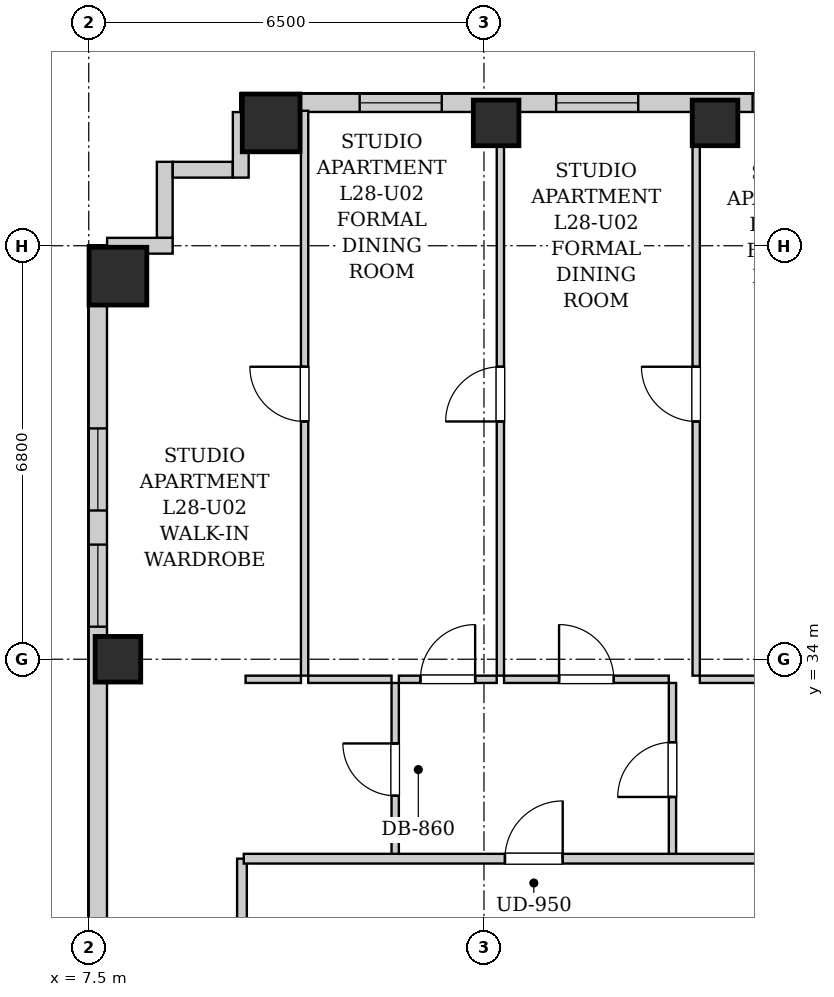
"""IFC4 building model, lengths in metres.
Left out: names, types, materials, properties, quantities, classifications, styles, units other than length and angle.
Written with IfcOpenShell. Run it as: python <this file> out.ifc"""

import sys

from ifc_helpers import new_model, si_unit, direction, frame, frame_2d, origin, origin_2d, place, context, subcontext, project, spatial, rectangle, extrude, element, fill, save


model = new_model("IFC4")
c1 = context("Model", 3, precision=1e-05, world=origin(), true_north=direction((0.0, 1.0)))
c2 = subcontext(c1, "Body", "Model", "MODEL_VIEW")
j1 = project(units=[si_unit("LENGTHUNIT", "METRE"), si_unit("PLANEANGLEUNIT", "RADIAN")], contexts=[c1])
p1 = place(None, origin())
s1 = spatial("IfcSite", under=j1, at=p1, CompositionType="ELEMENT")
p2 = place(p1, origin())
s2 = spatial("IfcBuilding", under=s1, at=p2, CompositionType="ELEMENT")
p3 = place(p2, frame((0.0, 0.0, 100.7)))
s3 = spatial("IfcBuildingStorey", under=s2, at=p3, CompositionType="ELEMENT", Elevation=100.7)
p4 = place(p3, frame((10.5, 42.82, 0.0), z_axis=(0.0, 0.0, 1.0), x_axis=(1.0, 0.0, 0.0)))
e1 = element("IfcColumn", 1, at=p4, inside=s3, PredefinedType="COLUMN", context=c2, shape_type="SweptSolid", body=[
    extrude(rectangle(XDim=0.95, YDim=0.95, at=origin_2d()), origin(), (0.0, 0.0, 1.0), 3.2),
])
for number, where, z_axis, x_axis in (
    (2, (14.2, 42.82, 0.0), (0.0, 0.0, 1.0), (1.0, 0.0, 0.0)),
    (3, (17.8, 42.82, 0.0), (0.0, 0.0, 1.0), (1.0, 0.0, 0.0)),
    (4, (7.98, 34.0, 0.0), (0.0, 0.0, 1.0), (1.0, 0.0, 0.0)),
):
    element("IfcColumn", number, at=place(p3, frame(where, z_axis=z_axis, x_axis=x_axis)), inside=s3, PredefinedType="COLUMN", context=c2, shape_type="SweptSolid", body=[
        extrude(rectangle(XDim=0.75, YDim=0.75, at=origin_2d()), origin(), (0.0, 0.0, 1.0), 3.2),
    ])
p5 = place(p3, frame((7.98, 40.3, 0.0), z_axis=(0.0, 0.0, 1.0), x_axis=(1.0, 0.0, 0.0)))
e5 = element("IfcColumn", 5, at=p5, inside=s3, PredefinedType="COLUMN", context=c2, shape_type="SweptSolid", body=[
    extrude(rectangle(XDim=0.95, YDim=0.95, at=origin_2d()), origin(), (0.0, 0.0, 1.0), 3.2),
])
p6 = place(p3, frame((10.0, 43.15, 0.0), z_axis=(0.0, 0.0, 1.0), x_axis=(1.0, 0.0, 0.0)))
e6 = element("IfcWall", 6, at=p6, inside=s3, PredefinedType="SOLIDWALL", context=c2, shape_type="SweptSolid", body=[
    extrude(rectangle(XDim=24.35, YDim=0.3, at=frame_2d((12.175, 0.0))), origin(), (0.0, 0.0, 1.0), 2.94),
])
p7 = place(p6, frame((1.956, 0.0, 0.55)))
e7 = element("IfcOpeningElement", 7, at=p7, cuts=e6, PredefinedType="OPENING", context=c2, shape_type="SweptSolid", body=[
    extrude(rectangle(XDim=1.35, YDim=1.2, at=frame_2d((0.675, 0.6))), frame((0.0, 0.16, 0.0), z_axis=(0.0, -1.0, 0.0), x_axis=(1.0, 0.0, 0.0)), (0.0, 0.0, 1.0), 0.32),
])
p8 = place(p6, frame((5.187, 0.0, 0.55)))
e8 = element("IfcOpeningElement", 8, at=p8, cuts=e6, PredefinedType="OPENING", context=c2, shape_type="SweptSolid", body=[
    extrude(rectangle(XDim=1.35, YDim=1.2, at=frame_2d((0.675, 0.6))), frame((0.0, 0.16, 0.0), z_axis=(0.0, -1.0, 0.0), x_axis=(1.0, 0.0, 0.0)), (0.0, 0.0, 1.0), 0.32),
])
p9 = place(p6, frame((8.418, 0.0, 0.55)))
e9 = element("IfcOpeningElement", 9, at=p9, cuts=e6, PredefinedType="OPENING", context=c2, shape_type="SweptSolid", body=[
    extrude(rectangle(XDim=1.35, YDim=1.2, at=frame_2d((0.675, 0.6))), frame((0.0, 0.16, 0.0), z_axis=(0.0, -1.0, 0.0), x_axis=(1.0, 0.0, 0.0)), (0.0, 0.0, 1.0), 0.32),
])
p10 = place(p6, frame((11.15, 0.0, 0.55)))
e10 = element("IfcOpeningElement", 10, at=p10, cuts=e6, PredefinedType="OPENING", context=c2, shape_type="SweptSolid", body=[
    extrude(rectangle(XDim=1.35, YDim=1.2, at=frame_2d((0.675, 0.6))), frame((0.0, 0.16, 0.0), z_axis=(0.0, -1.0, 0.0), x_axis=(1.0, 0.0, 0.0)), (0.0, 0.0, 1.0), 0.32),
])
p11 = place(p6, frame((18.038, 0.0, 0.55)))
e11 = element("IfcOpeningElement", 11, at=p11, cuts=e6, PredefinedType="OPENING", context=c2, shape_type="SweptSolid", body=[
    extrude(rectangle(XDim=1.35, YDim=1.2, at=frame_2d((0.675, 0.6))), frame((0.0, 0.16, 0.0), z_axis=(0.0, -1.0, 0.0), x_axis=(1.0, 0.0, 0.0)), (0.0, 0.0, 1.0), 0.32),
])
p12 = place(p6, frame((21.315, 0.0, 0.55)))
e12 = element("IfcOpeningElement", 12, at=p12, cuts=e6, PredefinedType="OPENING", context=c2, shape_type="SweptSolid", body=[
    extrude(rectangle(XDim=1.35, YDim=1.2, at=frame_2d((0.675, 0.6))), frame((0.0, 0.16, 0.0), z_axis=(0.0, -1.0, 0.0), x_axis=(1.0, 0.0, 0.0)), (0.0, 0.0, 1.0), 0.32),
])
p13 = place(p3, frame((7.65, 2.5, 0.0), z_axis=(0.0, 0.0, 1.0), x_axis=(0.0, 1.0, 0.0)))
e13 = element("IfcWall", 13, at=p13, inside=s3, PredefinedType="SOLIDWALL", context=c2, shape_type="SweptSolid", body=[
    extrude(rectangle(XDim=38.3, YDim=0.3, at=frame_2d((19.15, 0.0))), origin(), (0.0, 0.0, 1.0), 2.94),
])
p14 = place(p13, frame((3.38, 0.0, 0.55)))
e14 = element("IfcOpeningElement", 14, at=p14, cuts=e13, PredefinedType="OPENING", context=c2, shape_type="SweptSolid", body=[
    extrude(rectangle(XDim=1.35, YDim=1.2, at=frame_2d((0.675, 0.6))), frame((0.0, 0.16, 0.0), z_axis=(0.0, -1.0, 0.0), x_axis=(1.0, 0.0, 0.0)), (0.0, 0.0, 1.0), 0.32),
])
p15 = place(p13, frame((1.135, 0.0, 0.55)))
e15 = element("IfcOpeningElement", 15, at=p15, cuts=e13, PredefinedType="OPENING", context=c2, shape_type="SweptSolid", body=[
    extrude(rectangle(XDim=1.35, YDim=1.2, at=frame_2d((0.675, 0.6))), frame((0.0, 0.16, 0.0), z_axis=(0.0, -1.0, 0.0), x_axis=(1.0, 0.0, 0.0)), (0.0, 0.0, 1.0), 0.32),
])
p16 = place(p13, frame((33.946, 0.0, 0.55)))
e16 = element("IfcOpeningElement", 16, at=p16, cuts=e13, PredefinedType="OPENING", context=c2, shape_type="SweptSolid", body=[
    extrude(rectangle(XDim=1.35, YDim=1.2, at=frame_2d((0.675, 0.6))), frame((0.0, 0.16, 0.0), z_axis=(0.0, -1.0, 0.0), x_axis=(1.0, 0.0, 0.0)), (0.0, 0.0, 1.0), 0.32),
])
p17 = place(p13, frame((32.035, 0.0, 0.55)))
e17 = element("IfcOpeningElement", 17, at=p17, cuts=e13, PredefinedType="OPENING", context=c2, shape_type="SweptSolid", body=[
    extrude(rectangle(XDim=1.35, YDim=1.2, at=frame_2d((0.675, 0.6))), frame((0.0, 0.16, 0.0), z_axis=(0.0, -1.0, 0.0), x_axis=(1.0, 0.0, 0.0)), (0.0, 0.0, 1.0), 0.32),
])
p18 = place(p13, frame((15.65, 0.0, 0.55)))
e18 = element("IfcOpeningElement", 18, at=p18, cuts=e13, PredefinedType="OPENING", context=c2, shape_type="SweptSolid", body=[
    extrude(rectangle(XDim=1.35, YDim=1.2, at=frame_2d((0.675, 0.6))), frame((0.0, 0.16, 0.0), z_axis=(0.0, -1.0, 0.0), x_axis=(1.0, 0.0, 0.0)), (0.0, 0.0, 1.0), 0.32),
])
p19 = place(p13, frame((13.035, 0.0, 0.55)))
e19 = element("IfcOpeningElement", 19, at=p19, cuts=e13, PredefinedType="OPENING", context=c2, shape_type="SweptSolid", body=[
    extrude(rectangle(XDim=1.35, YDim=1.2, at=frame_2d((0.675, 0.6))), frame((0.0, 0.16, 0.0), z_axis=(0.0, -1.0, 0.0), x_axis=(1.0, 0.0, 0.0)), (0.0, 0.0, 1.0), 0.32),
])
p20 = place(p13, frame((22.831, 0.0, 0.55)))
e20 = element("IfcOpeningElement", 20, at=p20, cuts=e13, PredefinedType="OPENING", context=c2, shape_type="SweptSolid", body=[
    extrude(rectangle(XDim=1.35, YDim=1.2, at=frame_2d((0.675, 0.6))), frame((0.0, 0.16, 0.0), z_axis=(0.0, -1.0, 0.0), x_axis=(1.0, 0.0, 0.0)), (0.0, 0.0, 1.0), 0.32),
])
p21 = place(p13, frame((24.441, 0.0, 0.55)))
e21 = element("IfcOpeningElement", 21, at=p21, cuts=e13, PredefinedType="OPENING", context=c2, shape_type="SweptSolid", body=[
    extrude(rectangle(XDim=1.35, YDim=1.2, at=frame_2d((0.675, 0.6))), frame((0.0, 0.16, 0.0), z_axis=(0.0, -1.0, 0.0), x_axis=(1.0, 0.0, 0.0)), (0.0, 0.0, 1.0), 0.32),
])
p22 = place(p3, frame((7.802, 40.8, 0.0), z_axis=(0.0, 0.0, 1.0), x_axis=(1.0, 0.0, 0.0)))
e22 = element("IfcWall", 22, at=p22, inside=s3, PredefinedType="SOLIDWALL", context=c2, shape_type="SweptSolid", body=[
    extrude(rectangle(XDim=1.078, YDim=0.26, at=frame_2d((0.539, 0.0))), origin(), (0.0, 0.0, 1.0), 2.94),
])
p23 = place(p3, frame((8.75, 40.932, 0.0), z_axis=(0.0, 0.0, 1.0), x_axis=(0.0, 1.0, 0.0)))
e23 = element("IfcWall", 23, at=p23, inside=s3, PredefinedType="SOLIDWALL", context=c2, shape_type="SweptSolid", body=[
    extrude(rectangle(XDim=1.248, YDim=0.26, at=frame_2d((0.624, 0.0))), origin(), (0.0, 0.0, 1.0), 2.94),
])
p24 = place(p3, frame((8.882, 42.05, 0.0), z_axis=(0.0, 0.0, 1.0), x_axis=(1.0, 0.0, 0.0)))
e24 = element("IfcWall", 24, at=p24, inside=s3, PredefinedType="SOLIDWALL", context=c2, shape_type="SweptSolid", body=[
    extrude(rectangle(XDim=0.986, YDim=0.26, at=frame_2d((0.493, 0.0))), origin(), (0.0, 0.0, 1.0), 2.94),
])
p25 = place(p3, frame((10.0, 41.92, 0.0), z_axis=(0.0, 0.0, 1.0), x_axis=(0.0, 1.0, 0.0)))
e25 = element("IfcWall", 25, at=p25, inside=s3, PredefinedType="SOLIDWALL", context=c2, shape_type="SweptSolid", body=[
    extrude(rectangle(XDim=1.078, YDim=0.26, at=frame_2d((0.539, 0.0))), origin(), (0.0, 0.0, 1.0), 2.94),
])
p26 = place(p3, frame((10.02, 28.98, 0.0), z_axis=(0.0, 0.0, 1.0), x_axis=(0.0, 1.0, 0.0)))
e26 = element("IfcWall", 26, at=p26, inside=s3, PredefinedType="PARTITIONING", context=c2, shape_type="SweptSolid", body=[
    extrude(rectangle(XDim=1.74, YDim=0.16, at=frame_2d((0.87, 0.0))), origin(), (0.0, 0.0, 1.0), 2.94),
])
p27 = place(p3, frame((12.54, 30.76, 0.0), z_axis=(0.0, 0.0, 1.0), x_axis=(0.0, 1.0, 0.0)))
e27 = element("IfcWall", 27, at=p27, inside=s3, PredefinedType="PARTITIONING", context=c2, shape_type="SweptSolid", body=[
    extrude(rectangle(XDim=2.85, YDim=0.12, at=frame_2d((1.425, 0.0))), origin(), (0.0, 0.0, 1.0), 2.94),
])
p28 = place(p27, frame((0.995, 0.0, 0.0)))
e28 = element("IfcOpeningElement", 28, at=p28, cuts=e27, PredefinedType="OPENING", context=c2, shape_type="SweptSolid", body=[
    extrude(rectangle(XDim=0.86, YDim=2.05, at=frame_2d((0.43, 1.025))), frame((0.0, 0.07, 0.0), z_axis=(0.0, -1.0, 0.0), x_axis=(1.0, 0.0, 0.0)), (0.0, 0.0, 1.0), 0.14),
])
p29 = place(p3, frame((10.08, 33.67, 0.0), z_axis=(0.0, 0.0, 1.0), x_axis=(1.0, 0.0, 0.0)))
e29 = element("IfcWall", 29, at=p29, inside=s3, PredefinedType="PARTITIONING", context=c2, shape_type="SweptSolid", body=[
    extrude(rectangle(XDim=0.91, YDim=0.12, at=frame_2d((0.455, 0.0))), origin(), (0.0, 0.0, 1.0), 2.94),
])
p30 = place(p3, frame((11.11, 33.67, 0.0), z_axis=(0.0, 0.0, 1.0), x_axis=(1.0, 0.0, 0.0)))
e30 = element("IfcWall", 30, at=p30, inside=s3, PredefinedType="PARTITIONING", context=c2, shape_type="SweptSolid", body=[
    extrude(rectangle(XDim=1.37, YDim=0.12, at=frame_2d((0.685, 0.0))), origin(), (0.0, 0.0, 1.0), 2.94),
])
p31 = place(p3, frame((17.1, 30.76, 0.0), z_axis=(0.0, 0.0, 1.0), x_axis=(0.0, 1.0, 0.0)))
e31 = element("IfcWall", 31, at=p31, inside=s3, PredefinedType="PARTITIONING", context=c2, shape_type="SweptSolid", body=[
    extrude(rectangle(XDim=2.85, YDim=0.12, at=frame_2d((1.425, 0.0))), origin(), (0.0, 0.0, 1.0), 2.94),
])
p32 = place(p31, frame((0.975, 0.0, 0.0)))
e32 = element("IfcOpeningElement", 32, at=p32, cuts=e31, PredefinedType="OPENING", context=c2, shape_type="SweptSolid", body=[
    extrude(rectangle(XDim=0.9, YDim=2.05, at=frame_2d((0.45, 1.025))), frame((0.0, 0.07, 0.0), z_axis=(0.0, -1.0, 0.0), x_axis=(1.0, 0.0, 0.0)), (0.0, 0.0, 1.0), 0.14),
])
p33 = place(p3, frame((12.6, 33.67, 0.0), z_axis=(0.0, 0.0, 1.0), x_axis=(1.0, 0.0, 0.0)))
e33 = element("IfcWall", 33, at=p33, inside=s3, PredefinedType="PARTITIONING", context=c2, shape_type="SweptSolid", body=[
    extrude(rectangle(XDim=1.61, YDim=0.12, at=frame_2d((0.805, 0.0))), origin(), (0.0, 0.0, 1.0), 2.94),
])
p34 = place(p33, frame((0.355, 0.0, 0.0)))
e34 = element("IfcOpeningElement", 34, at=p34, cuts=e33, PredefinedType="OPENING", context=c2, shape_type="SweptSolid", body=[
    extrude(rectangle(XDim=0.9, YDim=2.05, at=frame_2d((0.45, 1.025))), frame((0.0, 0.07, 0.0), z_axis=(0.0, -1.0, 0.0), x_axis=(1.0, 0.0, 0.0)), (0.0, 0.0, 1.0), 0.14),
])
p35 = place(p3, frame((14.33, 33.67, 0.0), z_axis=(0.0, 0.0, 1.0), x_axis=(1.0, 0.0, 0.0)))
e35 = element("IfcWall", 35, at=p35, inside=s3, PredefinedType="PARTITIONING", context=c2, shape_type="SweptSolid", body=[
    extrude(rectangle(XDim=2.71, YDim=0.12, at=frame_2d((1.355, 0.0))), origin(), (0.0, 0.0, 1.0), 2.94),
])
p36 = place(p35, frame((0.905, 0.0, 0.0)))
e36 = element("IfcOpeningElement", 36, at=p36, cuts=e35, PredefinedType="OPENING", context=c2, shape_type="SweptSolid", body=[
    extrude(rectangle(XDim=0.9, YDim=2.05, at=frame_2d((0.45, 1.025))), frame((0.0, 0.07, 0.0), z_axis=(0.0, -1.0, 0.0), x_axis=(1.0, 0.0, 0.0)), (0.0, 0.0, 1.0), 0.14),
])
p37 = place(p3, frame((17.55, 33.67, 0.0), z_axis=(0.0, 0.0, 1.0), x_axis=(1.0, 0.0, 0.0)))
e37 = element("IfcWall", 37, at=p37, inside=s3, PredefinedType="PARTITIONING", context=c2, shape_type="SweptSolid", body=[
    extrude(rectangle(XDim=3.1, YDim=0.12, at=frame_2d((1.55, 0.0))), origin(), (0.0, 0.0, 1.0), 2.94),
])
p38 = place(p37, frame((1.1, 0.0, 0.0)))
e38 = element("IfcOpeningElement", 38, at=p38, cuts=e37, PredefinedType="OPENING", context=c2, shape_type="SweptSolid", body=[
    extrude(rectangle(XDim=0.9, YDim=2.05, at=frame_2d((0.45, 1.025))), frame((0.0, 0.07, 0.0), z_axis=(0.0, -1.0, 0.0), x_axis=(1.0, 0.0, 0.0)), (0.0, 0.0, 1.0), 0.14),
])
p39 = place(p3, frame((11.05, 33.73, 0.0), z_axis=(0.0, 0.0, 1.0), x_axis=(0.0, 1.0, 0.0)))
e39 = element("IfcWall", 39, at=p39, inside=s3, PredefinedType="PARTITIONING", context=c2, shape_type="SweptSolid", body=[
    extrude(rectangle(XDim=9.29, YDim=0.12, at=frame_2d((4.645, 0.0))), origin(), (0.0, 0.0, 1.0), 2.94),
])
p40 = place(p39, frame((4.18, 0.0, 0.0)))
e40 = element("IfcOpeningElement", 40, at=p40, cuts=e39, PredefinedType="OPENING", context=c2, shape_type="SweptSolid", body=[
    extrude(rectangle(XDim=0.9, YDim=2.05, at=frame_2d((0.45, 1.025))), frame((0.0, 0.07, 0.0), z_axis=(0.0, -1.0, 0.0), x_axis=(1.0, 0.0, 0.0)), (0.0, 0.0, 1.0), 0.14),
])
p41 = place(p3, frame((14.27, 33.73, 0.0), z_axis=(0.0, 0.0, 1.0), x_axis=(0.0, 1.0, 0.0)))
e41 = element("IfcWall", 41, at=p41, inside=s3, PredefinedType="PARTITIONING", context=c2, shape_type="SweptSolid", body=[
    extrude(rectangle(XDim=9.29, YDim=0.12, at=frame_2d((4.645, 0.0))), origin(), (0.0, 0.0, 1.0), 2.94),
])
p42 = place(p41, frame((4.18, 0.0, 0.0)))
e42 = element("IfcOpeningElement", 42, at=p42, cuts=e41, PredefinedType="OPENING", context=c2, shape_type="SweptSolid", body=[
    extrude(rectangle(XDim=0.9, YDim=2.05, at=frame_2d((0.45, 1.025))), frame((0.0, 0.07, 0.0), z_axis=(0.0, -1.0, 0.0), x_axis=(1.0, 0.0, 0.0)), (0.0, 0.0, 1.0), 0.14),
])
p43 = place(p3, frame((17.49, 33.73, 0.0), z_axis=(0.0, 0.0, 1.0), x_axis=(0.0, 1.0, 0.0)))
e43 = element("IfcWall", 43, at=p43, inside=s3, PredefinedType="PARTITIONING", context=c2, shape_type="SweptSolid", body=[
    extrude(rectangle(XDim=9.29, YDim=0.12, at=frame_2d((4.645, 0.0))), origin(), (0.0, 0.0, 1.0), 2.94),
])
p44 = place(p43, frame((4.18, 0.0, 0.0)))
e44 = element("IfcOpeningElement", 44, at=p44, cuts=e43, PredefinedType="OPENING", context=c2, shape_type="SweptSolid", body=[
    extrude(rectangle(XDim=0.9, YDim=2.05, at=frame_2d((0.45, 1.025))), frame((0.0, 0.07, 0.0), z_axis=(0.0, -1.0, 0.0), x_axis=(1.0, 0.0, 0.0)), (0.0, 0.0, 1.0), 0.14),
])
p45 = place(p3, frame((10.05, 30.72, 0.0), z_axis=(0.0, 0.0, 1.0), x_axis=(1.0, 0.0, 0.0)))
e45 = element("IfcWall", 45, at=p45, inside=s3, PredefinedType="PARTITIONING", context=c2, shape_type="SweptSolid", body=[
    extrude(rectangle(XDim=30.8, YDim=0.16, at=frame_2d((15.4, 0.0))), origin(), (0.0, 0.0, 1.0), 2.94),
])
p46 = place(p45, frame((4.295, 0.0, 0.0)))
e46 = element("IfcOpeningElement", 46, at=p46, cuts=e45, PredefinedType="OPENING", context=c2, shape_type="SweptSolid", body=[
    extrude(rectangle(XDim=0.95, YDim=2.1, at=frame_2d((0.475, 1.05))), frame((0.0, 0.09, 0.0), z_axis=(0.0, -1.0, 0.0), x_axis=(1.0, 0.0, 0.0)), (0.0, 0.0, 1.0), 0.18),
])
p47 = place(p28, origin())
e47 = element("IfcDoor", 47, at=p47, inside=s3, OperationType="SINGLE_SWING_RIGHT", PredefinedType="DOOR", context=c2, shape_type="SweptSolid", body=[
    extrude(rectangle(XDim=0.86, YDim=2.05, at=frame_2d((0.43, 1.025))), frame((0.0, 0.025, 0.0), z_axis=(0.0, -1.0, 0.0), x_axis=(1.0, 0.0, 0.0)), (0.0, 0.0, 1.0), 0.05),
])
fill(e28, e47)
p48 = place(p32, origin())
e48 = element("IfcDoor", 48, at=p48, inside=s3, OperationType="SINGLE_SWING_LEFT", PredefinedType="DOOR", context=c2, shape_type="SweptSolid", body=[
    extrude(rectangle(XDim=0.9, YDim=2.05, at=frame_2d((0.45, 1.025))), frame((0.0, 0.025, 0.0), z_axis=(0.0, -1.0, 0.0), x_axis=(1.0, 0.0, 0.0)), (0.0, 0.0, 1.0), 0.05),
])
fill(e32, e48)
p49 = place(p34, origin())
e49 = element("IfcDoor", 49, at=p49, inside=s3, OperationType="SINGLE_SWING_RIGHT", PredefinedType="DOOR", context=c2, shape_type="SweptSolid", body=[
    extrude(rectangle(XDim=0.9, YDim=2.05, at=frame_2d((0.45, 1.025))), frame((0.0, 0.025, 0.0), z_axis=(0.0, -1.0, 0.0), x_axis=(1.0, 0.0, 0.0)), (0.0, 0.0, 1.0), 0.05),
])
fill(e34, e49)
p50 = place(p36, origin())
e50 = element("IfcDoor", 50, at=p50, inside=s3, OperationType="SINGLE_SWING_LEFT", PredefinedType="DOOR", context=c2, shape_type="SweptSolid", body=[
    extrude(rectangle(XDim=0.9, YDim=2.05, at=frame_2d((0.45, 1.025))), frame((0.0, 0.025, 0.0), z_axis=(0.0, -1.0, 0.0), x_axis=(1.0, 0.0, 0.0)), (0.0, 0.0, 1.0), 0.05),
])
fill(e36, e50)
p51 = place(p40, origin())
e51 = element("IfcDoor", 51, at=p51, inside=s3, OperationType="SINGLE_SWING_RIGHT", PredefinedType="DOOR", context=c2, shape_type="SweptSolid", body=[
    extrude(rectangle(XDim=0.9, YDim=2.05, at=frame_2d((0.45, 1.025))), frame((0.0, 0.025, 0.0), z_axis=(0.0, -1.0, 0.0), x_axis=(1.0, 0.0, 0.0)), (0.0, 0.0, 1.0), 0.05),
])
fill(e40, e51)
p52 = place(p42, origin())
e52 = element("IfcDoor", 52, at=p52, inside=s3, OperationType="SINGLE_SWING_LEFT", PredefinedType="DOOR", context=c2, shape_type="SweptSolid", body=[
    extrude(rectangle(XDim=0.9, YDim=2.05, at=frame_2d((0.45, 1.025))), frame((0.0, 0.025, 0.0), z_axis=(0.0, -1.0, 0.0), x_axis=(1.0, 0.0, 0.0)), (0.0, 0.0, 1.0), 0.05),
])
fill(e42, e52)
p53 = place(p44, origin())
e53 = element("IfcDoor", 53, at=p53, inside=s3, OperationType="SINGLE_SWING_RIGHT", PredefinedType="DOOR", context=c2, shape_type="SweptSolid", body=[
    extrude(rectangle(XDim=0.9, YDim=2.05, at=frame_2d((0.45, 1.025))), frame((0.0, 0.025, 0.0), z_axis=(0.0, -1.0, 0.0), x_axis=(1.0, 0.0, 0.0)), (0.0, 0.0, 1.0), 0.05),
])
fill(e44, e53)
p54 = place(p46, origin())
e54 = element("IfcDoor", 54, at=p54, inside=s3, OperationType="SINGLE_SWING_RIGHT", PredefinedType="DOOR", context=c2, shape_type="SweptSolid", body=[
    extrude(rectangle(XDim=0.95, YDim=2.1, at=frame_2d((0.475, 1.05))), frame((0.0, 0.025, 0.0), z_axis=(0.0, -1.0, 0.0), x_axis=(1.0, 0.0, 0.0)), (0.0, 0.0, 1.0), 0.05),
])
fill(e46, e54)
p55 = place(p16, origin())
e55 = element("IfcWindow", 55, at=p55, inside=s3, PartitioningType="SINGLE_PANEL", PredefinedType="WINDOW", context=c2, shape_type="SweptSolid", body=[
    extrude(rectangle(XDim=1.35, YDim=1.2, at=frame_2d((0.675, 0.6))), frame((0.0, 0.03, 0.0), z_axis=(0.0, -1.0, 0.0), x_axis=(1.0, 0.0, 0.0)), (0.0, 0.0, 1.0), 0.06),
])
fill(e16, e55)
p56 = place(p17, origin())
e56 = element("IfcWindow", 56, at=p56, inside=s3, PartitioningType="SINGLE_PANEL", PredefinedType="WINDOW", context=c2, shape_type="SweptSolid", body=[
    extrude(rectangle(XDim=1.35, YDim=1.2, at=frame_2d((0.675, 0.6))), frame((0.0, 0.03, 0.0), z_axis=(0.0, -1.0, 0.0), x_axis=(1.0, 0.0, 0.0)), (0.0, 0.0, 1.0), 0.06),
])
fill(e17, e56)
p57 = place(p7, origin())
e57 = element("IfcWindow", 57, at=p57, inside=s3, PartitioningType="SINGLE_PANEL", PredefinedType="WINDOW", context=c2, shape_type="SweptSolid", body=[
    extrude(rectangle(XDim=1.35, YDim=1.2, at=frame_2d((0.675, 0.6))), frame((0.0, 0.03, 0.0), z_axis=(0.0, -1.0, 0.0), x_axis=(1.0, 0.0, 0.0)), (0.0, 0.0, 1.0), 0.06),
])
fill(e7, e57)
p58 = place(p8, origin())
e58 = element("IfcWindow", 58, at=p58, inside=s3, PartitioningType="SINGLE_PANEL", PredefinedType="WINDOW", context=c2, shape_type="SweptSolid", body=[
    extrude(rectangle(XDim=1.35, YDim=1.2, at=frame_2d((0.675, 0.6))), frame((0.0, 0.03, 0.0), z_axis=(0.0, -1.0, 0.0), x_axis=(1.0, 0.0, 0.0)), (0.0, 0.0, 1.0), 0.06),
])
fill(e8, e58)
p59 = place(p9, origin())
e59 = element("IfcWindow", 59, at=p59, inside=s3, PartitioningType="SINGLE_PANEL", PredefinedType="WINDOW", context=c2, shape_type="SweptSolid", body=[
    extrude(rectangle(XDim=1.35, YDim=1.2, at=frame_2d((0.675, 0.6))), frame((0.0, 0.03, 0.0), z_axis=(0.0, -1.0, 0.0), x_axis=(1.0, 0.0, 0.0)), (0.0, 0.0, 1.0), 0.06),
])
fill(e9, e59)
save(model, sys.argv[1])
